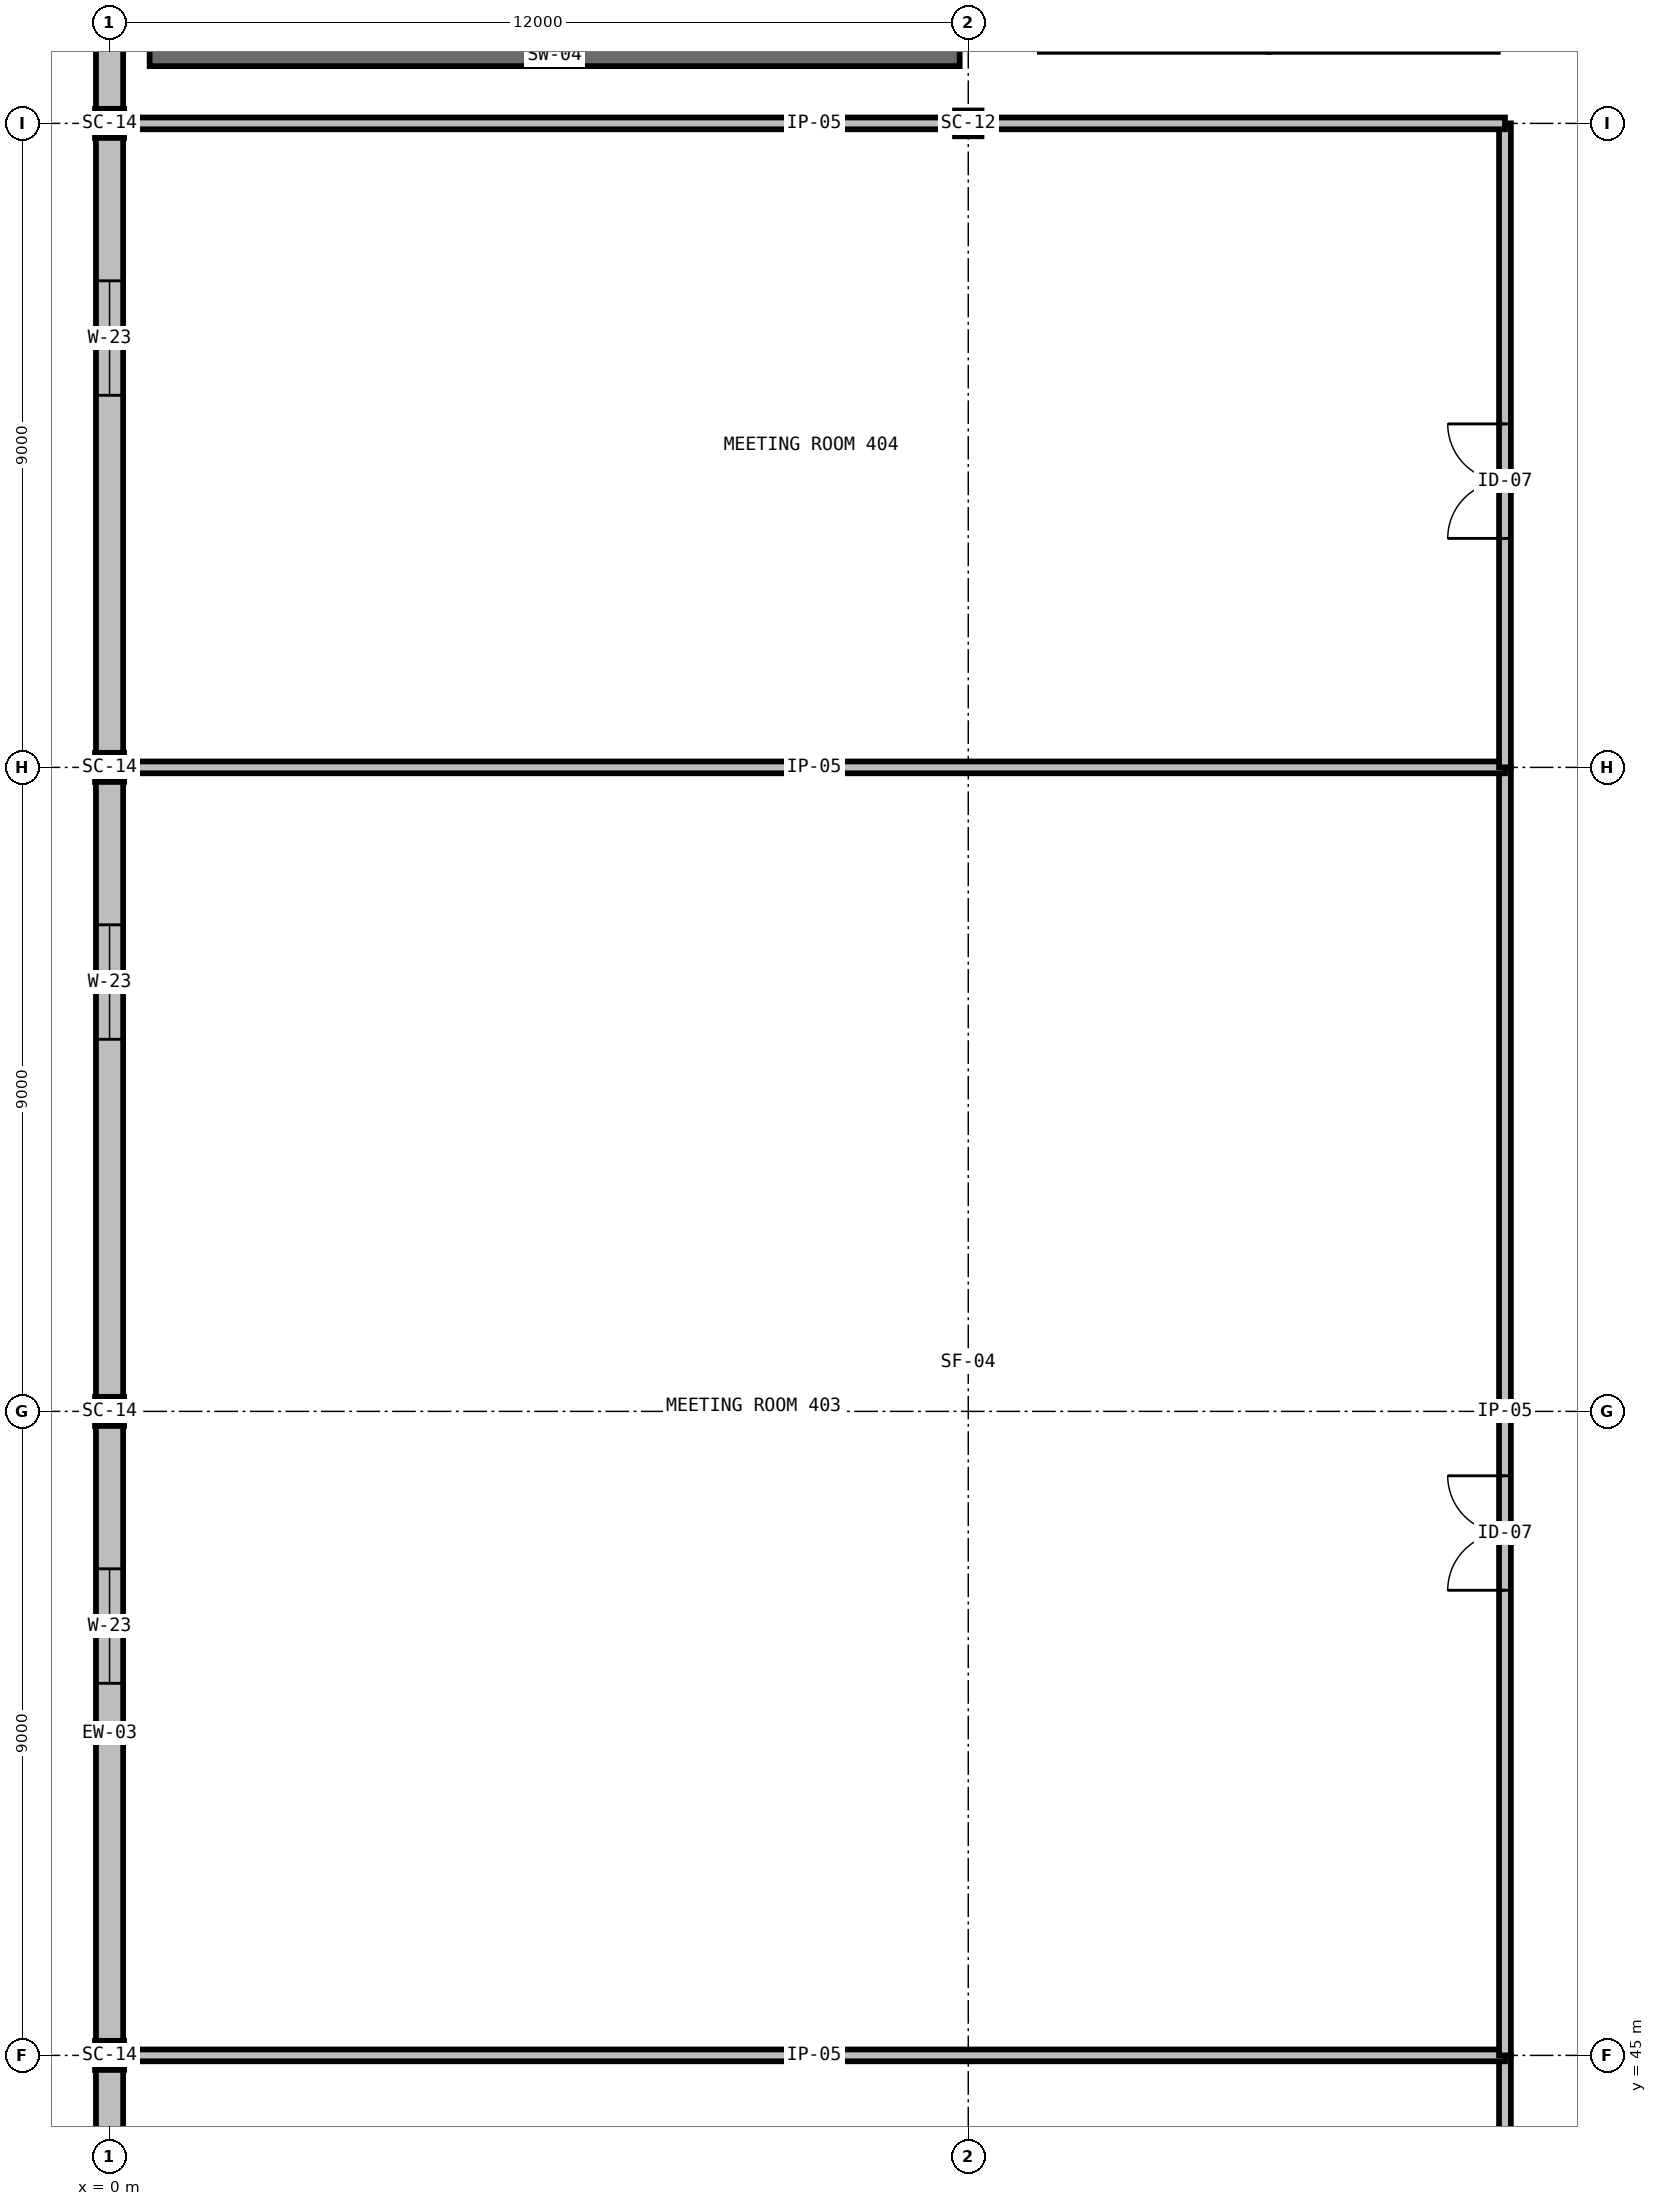
"""IFC4 building model, lengths in metres.
Left out: names, types, materials, properties, quantities, classifications, styles, units other than length and angle.
Written with IfcOpenShell. Run it as: python <this file> out.ifc"""

import sys

from ifc_helpers import new_model, si_unit, direction, frame, frame_2d, origin, origin_2d, place, context, subcontext, project, spatial, rectangle, hollow_rectangle, i_section, extrude, element, fill, save


model = new_model("IFC4")
c1 = context("Model", 3, precision=1e-05, world=origin(), true_north=direction((0.0, 1.0)))
c2 = subcontext(c1, "Body", "Model", "MODEL_VIEW")
j1 = project(units=[si_unit("LENGTHUNIT", "METRE"), si_unit("PLANEANGLEUNIT", "RADIAN")], contexts=[c1])
p1 = place(None, origin())
s1 = spatial("IfcSite", under=j1, at=p1, CompositionType="ELEMENT")
p2 = place(p1, origin())
s2 = spatial("IfcBuilding", under=s1, at=p2, CompositionType="ELEMENT")
p3 = place(p2, frame((0.0, 0.0, 23.4)))
s3 = spatial("IfcBuildingStorey", under=s2, at=p3, CompositionType="ELEMENT", Elevation=23.4)
for number, where, z_axis, x_axis in (
    (1, (0.0, 45.0, 0.0), (0.0, 0.0, 1.0), (1.0, 0.0, 0.0)),
    (2, (0.0, 54.0, 0.0), (0.0, 0.0, 1.0), (1.0, 0.0, 0.0)),
    (3, (0.0, 63.0, 0.0), (0.0, 0.0, 1.0), (1.0, 0.0, 0.0)),
    (4, (0.0, 72.0, 0.0), (0.0, 0.0, 1.0), (1.0, 0.0, 0.0)),
):
    element("IfcColumn", number, at=place(p3, frame(where, z_axis=z_axis, x_axis=x_axis)), inside=s3, PredefinedType="COLUMN", context=c2, shape_type="SweptSolid", body=[
        extrude(hollow_rectangle(XDim=0.406, YDim=0.406, WallThickness=0.015, at=origin_2d()), origin(), (0.0, 0.0, 1.0), 3.53),
    ])
p4 = place(p3, frame((12.0, 72.0, 0.0), z_axis=(0.0, 0.0, 1.0), x_axis=(1.0, 0.0, 0.0)))
e5 = element("IfcColumn", 5, at=p4, inside=s3, PredefinedType="COLUMN", context=c2, shape_type="SweptSolid", body=[
    extrude(i_section(OverallWidth=0.37, OverallDepth=0.36, WebThickness=0.012, FlangeThickness=0.02, FilletRadius=0.031, at=origin_2d()), origin(), (0.0, 0.0, 1.0), 3.85),
])
p5 = place(p3, frame((0.56, 72.95, 0.0), z_axis=(0.0, 0.0, 1.0), x_axis=(1.0, 0.0, 0.0)))
e6 = element("IfcWall", 6, at=p5, inside=s3, PredefinedType="SHEAR", context=c2, shape_type="SweptSolid", body=[
    extrude(rectangle(XDim=11.32, YDim=0.3, at=frame_2d((5.66, 0.0))), origin(), (0.0, 0.0, 1.0), 3.85),
])
p6 = place(p3, frame((0.0, 45.0, 0.0), z_axis=(0.0, 0.0, 1.0), x_axis=(0.0, -1.0, 0.0)))
e7 = element("IfcWall", 7, at=p6, inside=s3, PredefinedType="STANDARD", context=c2, shape_type="SweptSolid", body=[
    extrude(rectangle(XDim=9.0, YDim=0.38, at=frame_2d((4.5, 0.0))), origin(), (0.0, 0.0, 1.0), 3.119),
])
p7 = place(p6, frame((2.2, 0.0, 1.0)))
e8 = element("IfcOpeningElement", 8, at=p7, cuts=e7, PredefinedType="OPENING", context=c2, shape_type="SweptSolid", body=[
    extrude(rectangle(XDim=1.6, YDim=1.36, at=frame_2d((0.8, 0.68))), frame((0.0, 0.205, 0.0), z_axis=(0.0, -1.0, 0.0), x_axis=(1.0, 0.0, 0.0)), (0.0, 0.0, 1.0), 0.41),
])
p8 = place(p3, frame((0.0, 54.0, 0.0), z_axis=(0.0, 0.0, 1.0), x_axis=(0.0, -1.0, 0.0)))
e9 = element("IfcWall", 9, at=p8, inside=s3, PredefinedType="STANDARD", context=c2, shape_type="SweptSolid", body=[
    extrude(rectangle(XDim=9.0, YDim=0.38, at=frame_2d((4.5, 0.0))), origin(), (0.0, 0.0, 1.0), 3.119),
])
p9 = place(p8, frame((2.2, 0.0, 1.0)))
e10 = element("IfcOpeningElement", 10, at=p9, cuts=e9, PredefinedType="OPENING", context=c2, shape_type="SweptSolid", body=[
    extrude(rectangle(XDim=1.6, YDim=1.36, at=frame_2d((0.8, 0.68))), frame((0.0, 0.205, 0.0), z_axis=(0.0, -1.0, 0.0), x_axis=(1.0, 0.0, 0.0)), (0.0, 0.0, 1.0), 0.41),
])
p10 = place(p3, frame((0.0, 63.0, 0.0), z_axis=(0.0, 0.0, 1.0), x_axis=(0.0, -1.0, 0.0)))
e11 = element("IfcWall", 11, at=p10, inside=s3, PredefinedType="STANDARD", context=c2, shape_type="SweptSolid", body=[
    extrude(rectangle(XDim=9.0, YDim=0.38, at=frame_2d((4.5, 0.0))), origin(), (0.0, 0.0, 1.0), 3.119),
])
p11 = place(p10, frame((2.2, 0.0, 1.0)))
e12 = element("IfcOpeningElement", 12, at=p11, cuts=e11, PredefinedType="OPENING", context=c2, shape_type="SweptSolid", body=[
    extrude(rectangle(XDim=1.6, YDim=1.36, at=frame_2d((0.8, 0.68))), frame((0.0, 0.205, 0.0), z_axis=(0.0, -1.0, 0.0), x_axis=(1.0, 0.0, 0.0)), (0.0, 0.0, 1.0), 0.41),
])
p12 = place(p3, frame((0.0, 72.0, 0.0), z_axis=(0.0, 0.0, 1.0), x_axis=(0.0, -1.0, 0.0)))
e13 = element("IfcWall", 13, at=p12, inside=s3, PredefinedType="STANDARD", context=c2, shape_type="SweptSolid", body=[
    extrude(rectangle(XDim=9.0, YDim=0.38, at=frame_2d((4.5, 0.0))), origin(), (0.0, 0.0, 1.0), 3.119),
])
p13 = place(p12, frame((2.2, 0.0, 1.0)))
e14 = element("IfcOpeningElement", 14, at=p13, cuts=e13, PredefinedType="OPENING", context=c2, shape_type="SweptSolid", body=[
    extrude(rectangle(XDim=1.6, YDim=1.36, at=frame_2d((0.8, 0.68))), frame((0.0, 0.205, 0.0), z_axis=(0.0, -1.0, 0.0), x_axis=(1.0, 0.0, 0.0)), (0.0, 0.0, 1.0), 0.41),
])
p14 = place(p3, frame((0.0, 81.0, 0.0), z_axis=(0.0, 0.0, 1.0), x_axis=(0.0, -1.0, 0.0)))
e15 = element("IfcWall", 15, at=p14, inside=s3, PredefinedType="STANDARD", context=c2, shape_type="SweptSolid", body=[
    extrude(rectangle(XDim=9.0, YDim=0.38, at=frame_2d((4.5, 0.0))), origin(), (0.0, 0.0, 1.0), 3.119),
])
p15 = place(p14, frame((2.2, 0.0, 1.0)))
e16 = element("IfcOpeningElement", 16, at=p15, cuts=e15, PredefinedType="OPENING", context=c2, shape_type="SweptSolid", body=[
    extrude(rectangle(XDim=1.6, YDim=1.36, at=frame_2d((0.8, 0.68))), frame((0.0, 0.205, 0.0), z_axis=(0.0, -1.0, 0.0), x_axis=(1.0, 0.0, 0.0)), (0.0, 0.0, 1.0), 0.41),
])
p16 = place(p3, frame((0.14, 116.72, 3.85), z_axis=(0.0, 0.0, 1.0), x_axis=(0.0, -1.0, 0.0)))
e17 = element("IfcWall", 17, at=p16, inside=s3, PredefinedType="PARAPET", context=c2, shape_type="SweptSolid", body=[
    extrude(rectangle(XDim=116.44, YDim=0.28, at=frame_2d((58.22, 0.0))), origin(), (0.0, 0.0, 1.0), 1.2),
])
p17 = place(p3, frame((19.5, 27.0, 0.0), z_axis=(0.0, 0.0, 1.0), x_axis=(0.0, 1.0, 0.0)))
e18 = element("IfcWall", 18, at=p17, inside=s3, PredefinedType="PARTITIONING", context=c2, shape_type="SweptSolid", body=[
    extrude(rectangle(XDim=18.0, YDim=0.165, at=frame_2d((9.0, 0.0))), origin(), (0.0, 0.0, 1.0), 3.53),
])
p18 = place(p17, frame((6.5, 0.0, 0.0)))
e19 = element("IfcOpeningElement", 19, at=p18, cuts=e18, PredefinedType="OPENING", context=c2, shape_type="SweptSolid", body=[
    extrude(rectangle(XDim=1.6, YDim=2.25, at=frame_2d((0.8, 1.125))), frame((0.0, 0.098, 0.0), z_axis=(0.0, -1.0, 0.0), x_axis=(1.0, 0.0, 0.0)), (0.0, 0.0, 1.0), 0.195),
])
p19 = place(p3, frame((19.5, 45.0, 0.0), z_axis=(0.0, 0.0, 1.0), x_axis=(-1.0, 0.0, 0.0)))
e20 = element("IfcWall", 20, at=p19, inside=s3, PredefinedType="PARTITIONING", context=c2, shape_type="SweptSolid", body=[
    extrude(rectangle(XDim=19.31, YDim=0.165, at=frame_2d((9.655, 0.0))), origin(), (0.0, 0.0, 1.0), 2.408),
])
p20 = place(p3, frame((19.5, 45.0, 0.0), z_axis=(0.0, 0.0, 1.0), x_axis=(0.0, 1.0, 0.0)))
e21 = element("IfcWall", 21, at=p20, inside=s3, PredefinedType="PARTITIONING", context=c2, shape_type="SweptSolid", body=[
    extrude(rectangle(XDim=18.0, YDim=0.165, at=frame_2d((9.0, 0.0))), origin(), (0.0, 0.0, 1.0), 3.53),
])
p21 = place(p20, frame((6.5, 0.0, 0.0)))
e22 = element("IfcOpeningElement", 22, at=p21, cuts=e21, PredefinedType="OPENING", context=c2, shape_type="SweptSolid", body=[
    extrude(rectangle(XDim=1.6, YDim=2.25, at=frame_2d((0.8, 1.125))), frame((0.0, 0.098, 0.0), z_axis=(0.0, -1.0, 0.0), x_axis=(1.0, 0.0, 0.0)), (0.0, 0.0, 1.0), 0.195),
])
p22 = place(p3, frame((19.5, 63.0, 0.0), z_axis=(0.0, 0.0, 1.0), x_axis=(-1.0, 0.0, 0.0)))
e23 = element("IfcWall", 23, at=p22, inside=s3, PredefinedType="PARTITIONING", context=c2, shape_type="SweptSolid", body=[
    extrude(rectangle(XDim=19.31, YDim=0.165, at=frame_2d((9.655, 0.0))), origin(), (0.0, 0.0, 1.0), 2.408),
])
p23 = place(p3, frame((19.5, 63.0, 0.0), z_axis=(0.0, 0.0, 1.0), x_axis=(0.0, 1.0, 0.0)))
e24 = element("IfcWall", 24, at=p23, inside=s3, PredefinedType="PARTITIONING", context=c2, shape_type="SweptSolid", body=[
    extrude(rectangle(XDim=9.0, YDim=0.165, at=frame_2d((4.5, 0.0))), origin(), (0.0, 0.0, 1.0), 3.53),
])
p24 = place(p23, frame((3.2, 0.0, 0.0)))
e25 = element("IfcOpeningElement", 25, at=p24, cuts=e24, PredefinedType="OPENING", context=c2, shape_type="SweptSolid", body=[
    extrude(rectangle(XDim=1.6, YDim=2.25, at=frame_2d((0.8, 1.125))), frame((0.0, 0.098, 0.0), z_axis=(0.0, -1.0, 0.0), x_axis=(1.0, 0.0, 0.0)), (0.0, 0.0, 1.0), 0.195),
])
p25 = place(p3, frame((19.5, 72.0, 0.0), z_axis=(0.0, 0.0, 1.0), x_axis=(-1.0, 0.0, 0.0)))
e26 = element("IfcWall", 26, at=p25, inside=s3, PredefinedType="PARTITIONING", context=c2, shape_type="SweptSolid", body=[
    extrude(rectangle(XDim=19.31, YDim=0.165, at=frame_2d((9.655, 0.0))), origin(), (0.0, 0.0, 1.0), 2.752),
])
p26 = place(p9, origin())
e27 = element("IfcWindow", 27, at=p26, inside=s3, PartitioningType="SINGLE_PANEL", PredefinedType="WINDOW", context=c2, shape_type="SweptSolid", body=[
    extrude(rectangle(XDim=1.6, YDim=1.36, at=frame_2d((0.8, 0.68))), frame((0.0, 0.03, 0.0), z_axis=(0.0, -1.0, 0.0), x_axis=(1.0, 0.0, 0.0)), (0.0, 0.0, 1.0), 0.06),
])
fill(e10, e27)
p27 = place(p11, origin())
e28 = element("IfcWindow", 28, at=p27, inside=s3, PartitioningType="SINGLE_PANEL", PredefinedType="WINDOW", context=c2, shape_type="SweptSolid", body=[
    extrude(rectangle(XDim=1.6, YDim=1.36, at=frame_2d((0.8, 0.68))), frame((0.0, 0.03, 0.0), z_axis=(0.0, -1.0, 0.0), x_axis=(1.0, 0.0, 0.0)), (0.0, 0.0, 1.0), 0.06),
])
fill(e12, e28)
p28 = place(p13, origin())
e29 = element("IfcWindow", 29, at=p28, inside=s3, PartitioningType="SINGLE_PANEL", PredefinedType="WINDOW", context=c2, shape_type="SweptSolid", body=[
    extrude(rectangle(XDim=1.6, YDim=1.36, at=frame_2d((0.8, 0.68))), frame((0.0, 0.03, 0.0), z_axis=(0.0, -1.0, 0.0), x_axis=(1.0, 0.0, 0.0)), (0.0, 0.0, 1.0), 0.06),
])
fill(e14, e29)
p29 = place(p21, origin())
e30 = element("IfcDoor", 30, at=p29, inside=s3, OperationType="DOUBLE_DOOR_SINGLE_SWING", PredefinedType="DOOR", context=c2, shape_type="SweptSolid", body=[
    extrude(rectangle(XDim=1.6, YDim=2.25, at=frame_2d((0.8, 1.125))), frame((0.0, 0.025, 0.0), z_axis=(0.0, -1.0, 0.0), x_axis=(1.0, 0.0, 0.0)), (0.0, 0.0, 1.0), 0.05),
])
fill(e22, e30)
p30 = place(p24, origin())
e31 = element("IfcDoor", 31, at=p30, inside=s3, OperationType="DOUBLE_DOOR_SINGLE_SWING", PredefinedType="DOOR", context=c2, shape_type="SweptSolid", body=[
    extrude(rectangle(XDim=1.6, YDim=2.25, at=frame_2d((0.8, 1.125))), frame((0.0, 0.025, 0.0), z_axis=(0.0, -1.0, 0.0), x_axis=(1.0, 0.0, 0.0)), (0.0, 0.0, 1.0), 0.05),
])
fill(e25, e31)
save(model, sys.argv[1])
